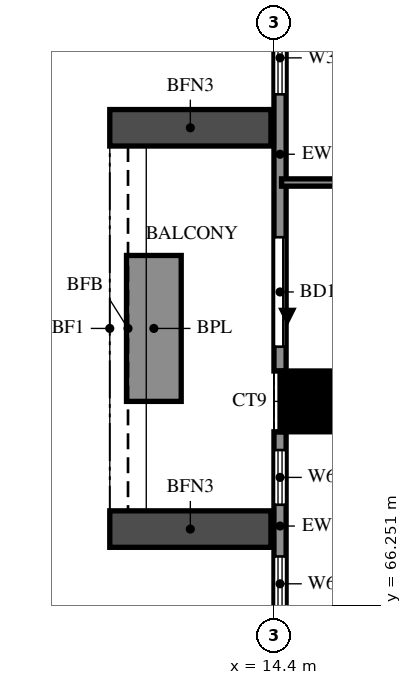
"""IFC4 building model, lengths in metres.
Left out: names, types, materials, properties, quantities, classifications, styles, units other than length and angle.
Written with IfcOpenShell. Run it as: python <this file> out.ifc"""

import sys

from ifc_helpers import new_model, si_unit, direction, frame, frame_2d, origin, origin_2d, place, context, subcontext, project, spatial, rectangle, extrude, source, transform, mapped, element, fill, save


model = new_model("IFC4")
c1 = context("Model", 3, precision=1e-05, world=origin(), true_north=direction((0.0, 1.0)))
c2 = subcontext(c1, "Body", "Model", "MODEL_VIEW")
j1 = project(units=[si_unit("LENGTHUNIT", "METRE"), si_unit("PLANEANGLEUNIT", "RADIAN")], contexts=[c1])
p1 = place(None, origin())
s1 = spatial("IfcSite", under=j1, at=p1, CompositionType="ELEMENT")
p2 = place(p1, origin())
s2 = spatial("IfcBuilding", under=s1, at=p2, CompositionType="ELEMENT")
p3 = place(p2, frame((0.0, 0.0, 86.5)))
s3 = spatial("IfcBuildingStorey", under=s2, at=p3, CompositionType="ELEMENT", Elevation=86.5)
m1 = source(origin(), c2, "Body", "SweptSolid", [
    extrude(rectangle(XDim=1.0, YDim=1.0, at=origin_2d()), origin(), (0.0, 0.0, 1.0), 3.18),
])
p4 = place(p3, frame((15.0, 69.6, 0.0), z_axis=(0.0, 0.0, 1.0), x_axis=(1.0, 0.0, 0.0)))
e1 = element("IfcColumn", 1, at=p4, inside=s3, PredefinedType="COLUMN", context=c2, shape_type="MappedRepresentation", body=[
    mapped(m1, transform((0.0, 0.0, 0.0))),
])
p5 = place(p3, frame((14.5, 76.3, 0.0), z_axis=(0.0, 0.0, 1.0), x_axis=(0.0, -1.0, 0.0)))
e2 = element("IfcWall", 2, at=p5, inside=s3, PredefinedType="SOLIDWALL", context=c2, shape_type="SweptSolid", body=[
    extrude(rectangle(XDim=6.2, YDim=0.2, at=frame_2d((3.1, 0.0))), origin(), (0.0, 0.0, 1.0), 3.18),
])
p6 = place(p5, frame((4.0, 0.0, 0.0)))
e3 = element("IfcOpeningElement", 3, at=p6, cuts=e2, PredefinedType="OPENING", context=c2, shape_type="SweptSolid", body=[
    extrude(rectangle(XDim=1.8, YDim=2.4, at=frame_2d((0.9, 1.2))), frame((0.0, 0.11, 0.0), z_axis=(0.0, -1.0, 0.0), x_axis=(1.0, 0.0, 0.0)), (0.0, 0.0, 1.0), 0.22),
])
p7 = place(p5, frame((0.45, 0.0, 0.6)))
e4 = element("IfcOpeningElement", 4, at=p7, cuts=e2, PredefinedType="OPENING", context=c2, shape_type="SweptSolid", body=[
    extrude(rectangle(XDim=1.2, YDim=2.4, at=frame_2d((0.6, 1.2))), frame((0.0, 0.11, 0.0), z_axis=(0.0, -1.0, 0.0), x_axis=(1.0, 0.0, 0.0)), (0.0, 0.0, 1.0), 0.22),
])
p8 = place(p3, frame((14.5, 69.1, 0.0), z_axis=(0.0, 0.0, 1.0), x_axis=(0.0, -1.0, 0.0)))
e5 = element("IfcWall", 5, at=p8, inside=s3, PredefinedType="SOLIDWALL", context=c2, shape_type="SweptSolid", body=[
    extrude(rectangle(XDim=6.2, YDim=0.2, at=frame_2d((3.1, 0.0))), origin(), (0.0, 0.0, 1.0), 3.18),
])
p9 = place(p8, frame((3.65, 0.0, 0.6)))
e6 = element("IfcOpeningElement", 6, at=p9, cuts=e5, PredefinedType="OPENING", context=c2, shape_type="SweptSolid", body=[
    extrude(rectangle(XDim=1.8, YDim=2.4, at=frame_2d((0.9, 1.2))), frame((0.0, 0.11, 0.0), z_axis=(0.0, -1.0, 0.0), x_axis=(1.0, 0.0, 0.0)), (0.0, 0.0, 1.0), 0.22),
])
p10 = place(p8, frame((0.3, 0.0, 1.5)))
e7 = element("IfcOpeningElement", 7, at=p10, cuts=e5, PredefinedType="OPENING", context=c2, shape_type="SweptSolid", body=[
    extrude(rectangle(XDim=0.9, YDim=0.9, at=frame_2d((0.45, 0.45))), frame((0.0, 0.11, 0.0), z_axis=(0.0, -1.0, 0.0), x_axis=(1.0, 0.0, 0.0)), (0.0, 0.0, 1.0), 0.22),
])
p11 = place(p8, frame((2.05, 0.0, 1.5)))
e8 = element("IfcOpeningElement", 8, at=p11, cuts=e5, PredefinedType="OPENING", context=c2, shape_type="SweptSolid", body=[
    extrude(rectangle(XDim=0.9, YDim=0.9, at=frame_2d((0.45, 0.45))), frame((0.0, 0.11, 0.0), z_axis=(0.0, -1.0, 0.0), x_axis=(1.0, 0.0, 0.0)), (0.0, 0.0, 1.0), 0.22),
])
for number, where, z_axis, x_axis in (
    (9, (14.35, 74.1, 0.0), (0.0, 0.0, 1.0), (-1.0, 0.0, 0.0)),
    (10, (14.35, 67.5, 0.0), (0.0, 0.0, 1.0), (-1.0, 0.0, 0.0)),
):
    element("IfcWall", number, at=place(p3, frame(where, z_axis=z_axis, x_axis=x_axis)), inside=s3, PredefinedType="SOLIDWALL", context=c2, shape_type="SweptSolid", body=[
        extrude(rectangle(XDim=2.65, YDim=0.6, at=frame_2d((1.325, 0.0))), origin(), (0.0, 0.0, 1.0), 2.85),
    ])
p12 = place(p3, frame((12.425, 72.0, 0.0), z_axis=(0.0, 0.0, 1.0), x_axis=(0.0, -1.0, 0.0)))
e11 = element("IfcWall", 11, at=p12, inside=s3, PredefinedType="SOLIDWALL", context=c2, shape_type="SweptSolid", body=[
    extrude(rectangle(XDim=2.4, YDim=0.9, at=frame_2d((1.2, 0.0))), origin(), (0.0, 0.0, 1.0), 0.9),
])
p13 = place(p3, frame((14.525, 69.6, 0.0), z_axis=(0.0, 0.0, 1.0), x_axis=(1.0, 0.0, 0.0)))
e12 = element("IfcWall", 12, at=p13, inside=s3, PredefinedType="PARTITIONING", context=c2, shape_type="SweptSolid", body=[
    extrude(rectangle(XDim=7.075, YDim=0.12, at=frame_2d((3.538, 0.0))), origin(), (0.0, 0.0, 1.0), 3.18),
])
p14 = place(p3, frame((14.525, 73.2, 0.0), z_axis=(0.0, 0.0, 1.0), x_axis=(1.0, 0.0, 0.0)))
e13 = element("IfcWall", 13, at=p14, inside=s3, PredefinedType="PARTITIONING", context=c2, shape_type="SweptSolid", body=[
    extrude(rectangle(XDim=11.875, YDim=0.12, at=frame_2d((5.938, 0.0))), origin(), (0.0, 0.0, 1.0), 2.28),
])
p15 = place(p14, frame((7.675, 0.0, 0.0)))
e14 = element("IfcOpeningElement", 14, at=p15, cuts=e13, PredefinedType="OPENING", context=c2, shape_type="SweptSolid", body=[
    extrude(rectangle(XDim=0.9, YDim=2.1, at=frame_2d((0.45, 1.05))), frame((0.0, 0.07, 0.0), z_axis=(0.0, -1.0, 0.0), x_axis=(1.0, 0.0, 0.0)), (0.0, 0.0, 1.0), 0.14),
])
p16 = place(p6, origin())
e15 = element("IfcDoor", 15, at=p16, inside=s3, OperationType="DOUBLE_DOOR_SLIDING", PredefinedType="DOOR", context=c2, shape_type="SweptSolid", body=[
    extrude(rectangle(XDim=1.8, YDim=2.4, at=frame_2d((0.9, 1.2))), frame((0.0, 0.025, 0.0), z_axis=(0.0, -1.0, 0.0), x_axis=(1.0, 0.0, 0.0)), (0.0, 0.0, 1.0), 0.05),
])
fill(e3, e15)
p17 = place(p7, origin())
e16 = element("IfcWindow", 16, at=p17, inside=s3, PartitioningType="SINGLE_PANEL", PredefinedType="WINDOW", context=c2, shape_type="SweptSolid", body=[
    extrude(rectangle(XDim=1.2, YDim=2.4, at=frame_2d((0.6, 1.2))), frame((0.0, 0.03, 0.0), z_axis=(0.0, -1.0, 0.0), x_axis=(1.0, 0.0, 0.0)), (0.0, 0.0, 1.0), 0.06),
])
fill(e4, e16)
p18 = place(p10, origin())
e17 = element("IfcWindow", 17, at=p18, inside=s3, PartitioningType="SINGLE_PANEL", PredefinedType="WINDOW", context=c2, shape_type="SweptSolid", body=[
    extrude(rectangle(XDim=0.9, YDim=0.9, at=frame_2d((0.45, 0.45))), frame((0.0, 0.03, 0.0), z_axis=(0.0, -1.0, 0.0), x_axis=(1.0, 0.0, 0.0)), (0.0, 0.0, 1.0), 0.06),
])
fill(e7, e17)
p19 = place(p11, origin())
e18 = element("IfcWindow", 18, at=p19, inside=s3, PartitioningType="SINGLE_PANEL", PredefinedType="WINDOW", context=c2, shape_type="SweptSolid", body=[
    extrude(rectangle(XDim=0.9, YDim=0.9, at=frame_2d((0.45, 0.45))), frame((0.0, 0.03, 0.0), z_axis=(0.0, -1.0, 0.0), x_axis=(1.0, 0.0, 0.0)), (0.0, 0.0, 1.0), 0.06),
])
fill(e8, e18)
save(model, sys.argv[1])
